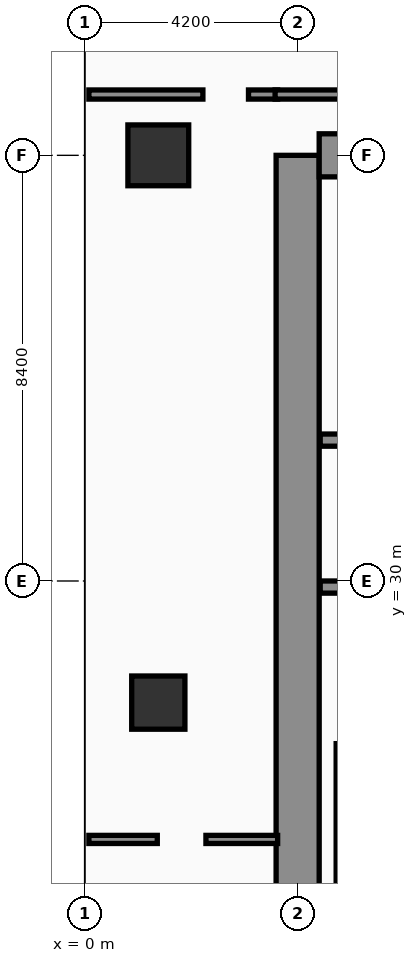
"""IFC4 building model, lengths in metres.
Left out: names, types, materials, properties, quantities, classifications, styles, units other than length and angle.
Written with IfcOpenShell. Run it as: python <this file> out.ifc"""

import sys

from ifc_helpers import new_model, si_unit, direction, frame, frame_2d, origin, origin_2d, place, context, subcontext, project, spatial, rectangle, extrude, element, fill, save


model = new_model("IFC4")
c1 = context("Model", 3, precision=1e-05, world=origin(), true_north=direction((0.0, 1.0)))
c2 = subcontext(c1, "Body", "Model", "MODEL_VIEW")
j1 = project(units=[si_unit("LENGTHUNIT", "METRE"), si_unit("PLANEANGLEUNIT", "RADIAN")], contexts=[c1])
p1 = place(None, origin())
s1 = spatial("IfcSite", under=j1, at=p1, CompositionType="ELEMENT")
p2 = place(p1, origin())
s2 = spatial("IfcBuilding", under=s1, at=p2, CompositionType="ELEMENT")
p3 = place(p2, frame((0.0, 0.0, 116.4)))
s3 = spatial("IfcBuildingStorey", under=s2, at=p3, CompositionType="ELEMENT", Elevation=116.4)
p4 = place(p3, frame((4.2, 16.8, 0.0), z_axis=(0.0, 0.0, 1.0), x_axis=(0.0, 1.0, 0.0)))
e1 = element("IfcWall", 1, at=p4, inside=s3, PredefinedType="SHEAR", context=c2, shape_type="SweptSolid", body=[
    extrude(rectangle(XDim=21.6, YDim=0.85, at=frame_2d((10.8, 0.0))), origin(), (0.0, 0.0, 1.0), 3.56),
])
p5 = place(p3, frame((4.625, 38.4, 0.0), z_axis=(0.0, 0.0, 1.0), x_axis=(1.0, 0.0, 0.0)))
e2 = element("IfcWall", 2, at=p5, inside=s3, PredefinedType="SHEAR", context=c2, shape_type="SweptSolid", body=[
    extrude(rectangle(XDim=9.95, YDim=0.85, at=frame_2d((4.975, 0.0))), origin(), (0.0, 0.0, 1.0), 3.56),
])
p6 = place(p3, frame((5.08, 17.225, 0.0), z_axis=(0.0, 0.0, 1.0), x_axis=(0.0, 1.0, 0.0)))
e3 = element("IfcWall", 3, at=p6, inside=s3, PredefinedType="SOLIDWALL", context=c2, shape_type="SweptSolid", body=[
    extrude(rectangle(XDim=9.565, YDim=0.24, at=frame_2d((4.782, 0.0))), origin(), (0.0, 0.0, 1.0), 3.56),
])
p7 = place(p3, frame((1.45, 27.6, 0.0), z_axis=(0.0, 0.0, 1.0), x_axis=(1.0, 0.0, 0.0)))
e4 = element("IfcColumn", 4, at=p7, inside=s3, PredefinedType="COLUMN", context=c2, shape_type="SweptSolid", body=[
    extrude(rectangle(XDim=1.05, YDim=1.05, at=origin_2d()), origin(), (0.0, 0.0, 1.0), 3.56),
])
p8 = place(p3, frame((1.45, 38.4, 0.0), z_axis=(0.0, 0.0, 1.0), x_axis=(1.0, 0.0, 0.0)))
e5 = element("IfcColumn", 5, at=p8, inside=s3, PredefinedType="COLUMN", context=c2, shape_type="SweptSolid", body=[
    extrude(rectangle(XDim=1.2, YDim=1.2, at=origin_2d()), origin(), (0.0, 0.0, 1.0), 3.56),
])
p9 = place(p3, frame((4.645, 29.88, 0.0), z_axis=(0.0, 0.0, 1.0), x_axis=(1.0, 0.0, 0.0)))
e6 = element("IfcWall", 6, at=p9, inside=s3, PredefinedType="SOLIDWALL", context=c2, shape_type="SweptSolid", body=[
    extrude(rectangle(XDim=4.775, YDim=0.24, at=frame_2d((2.387, 0.0))), origin(), (0.0, 0.0, 1.0), 3.56),
])
p10 = place(p9, frame((0.45, 0.0, 0.0)))
e7 = element("IfcOpeningElement", 7, at=p10, cuts=e6, PredefinedType="OPENING", context=c2, shape_type="SweptSolid", body=[
    extrude(rectangle(XDim=1.3, YDim=2.35, at=frame_2d((0.65, 1.175))), frame((0.0, 0.13, 0.0), z_axis=(0.0, -1.0, 0.0), x_axis=(1.0, 0.0, 0.0)), (0.0, 0.0, 1.0), 0.26),
])
p11 = place(p3, frame((4.645, 32.78, 0.0), z_axis=(0.0, 0.0, 1.0), x_axis=(1.0, 0.0, 0.0)))
e8 = element("IfcWall", 8, at=p11, inside=s3, PredefinedType="SOLIDWALL", context=c2, shape_type="SweptSolid", body=[
    extrude(rectangle(XDim=4.775, YDim=0.24, at=frame_2d((2.387, 0.0))), origin(), (0.0, 0.0, 1.0), 3.19),
])
p12 = place(p3, frame((0.08, 24.9, 0.0), z_axis=(0.0, 0.0, 1.0), x_axis=(1.0, 0.0, 0.0)))
e9 = element("IfcWall", 9, at=p12, inside=s3, PredefinedType="PARTITIONING", context=c2, shape_type="SweptSolid", body=[
    extrude(rectangle(XDim=3.725, YDim=0.16, at=frame_2d((1.862, 0.0))), origin(), (0.0, 0.0, 1.0), 3.04),
])
p13 = place(p12, frame((1.35, 0.0, 0.0)))
e10 = element("IfcOpeningElement", 10, at=p13, cuts=e9, PredefinedType="OPENING", context=c2, shape_type="SweptSolid", body=[
    extrude(rectangle(XDim=0.96, YDim=2.2, at=frame_2d((0.48, 1.1))), frame((0.0, 0.09, 0.0), z_axis=(0.0, -1.0, 0.0), x_axis=(1.0, 0.0, 0.0)), (0.0, 0.0, 1.0), 0.18),
])
p14 = place(p3, frame((0.08, 39.6, 0.0), z_axis=(0.0, 0.0, 1.0), x_axis=(1.0, 0.0, 0.0)))
e11 = element("IfcWall", 11, at=p14, inside=s3, PredefinedType="PARTITIONING", context=c2, shape_type="SweptSolid", body=[
    extrude(rectangle(XDim=3.725, YDim=0.18, at=frame_2d((1.862, 0.0))), origin(), (0.0, 0.0, 1.0), 2.84),
])
p15 = place(p14, frame((2.25, 0.0, 0.0)))
e12 = element("IfcOpeningElement", 12, at=p15, cuts=e11, PredefinedType="OPENING", context=c2, shape_type="SweptSolid", body=[
    extrude(rectangle(XDim=0.9, YDim=2.15, at=frame_2d((0.45, 1.075))), frame((0.0, 0.1, 0.0), z_axis=(0.0, -1.0, 0.0), x_axis=(1.0, 0.0, 0.0)), (0.0, 0.0, 1.0), 0.2),
])
p16 = place(p3, frame((3.755, 39.6, 0.0), z_axis=(0.0, 0.0, 1.0), x_axis=(1.0, 0.0, 0.0)))
e13 = element("IfcWall", 13, at=p16, inside=s3, PredefinedType="PARTITIONING", context=c2, shape_type="SweptSolid", body=[
    extrude(rectangle(XDim=11.395, YDim=0.18, at=frame_2d((5.698, 0.0))), origin(), (0.0, 0.0, 1.0), 2.84),
])
p17 = place(p13, origin())
e14 = element("IfcDoor", 14, at=p17, inside=s3, OperationType="SINGLE_SWING_LEFT", PredefinedType="DOOR", context=c2, shape_type="SweptSolid", body=[
    extrude(rectangle(XDim=0.96, YDim=2.2, at=frame_2d((0.48, 1.1))), frame((0.0, 0.025, 0.0), z_axis=(0.0, -1.0, 0.0), x_axis=(1.0, 0.0, 0.0)), (0.0, 0.0, 1.0), 0.05),
])
fill(e10, e14)
p18 = place(p15, origin())
e15 = element("IfcDoor", 15, at=p18, inside=s3, OperationType="SINGLE_SWING_LEFT", PredefinedType="DOOR", context=c2, shape_type="SweptSolid", body=[
    extrude(rectangle(XDim=0.9, YDim=2.15, at=frame_2d((0.45, 1.075))), frame((0.0, 0.025, 0.0), z_axis=(0.0, -1.0, 0.0), x_axis=(1.0, 0.0, 0.0)), (0.0, 0.0, 1.0), 0.05),
])
fill(e12, e15)
save(model, sys.argv[1])
